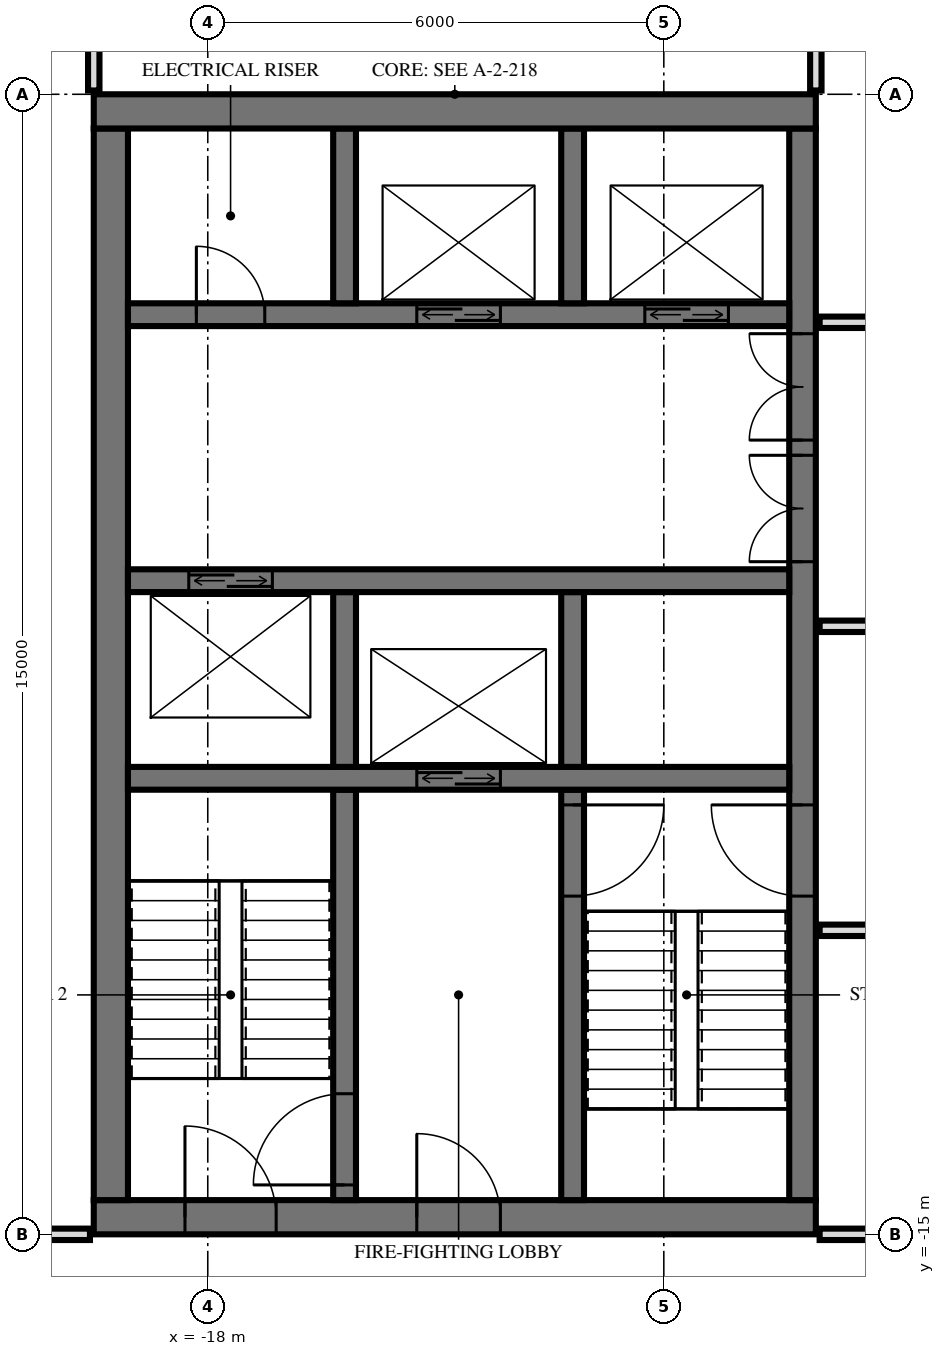
"""IFC4 building model, lengths in metres.
Left out: names, types, materials, properties, quantities, classifications, styles, units other than length and angle.
Written with IfcOpenShell. Run it as: python <this file> out.ifc"""

import sys

from ifc_helpers import new_model, si_unit, direction, frame, frame_2d, origin, place, context, subcontext, project, spatial, rectangle, extrude, element, fill, save


model = new_model("IFC4")
c1 = context("Model", 3, precision=1e-05, world=origin(), true_north=direction((0.0, 1.0)))
c2 = subcontext(c1, "Body", "Model", "MODEL_VIEW")
j1 = project(units=[si_unit("LENGTHUNIT", "METRE"), si_unit("PLANEANGLEUNIT", "RADIAN")], contexts=[c1])
p1 = place(None, origin())
s1 = spatial("IfcSite", under=j1, at=p1, CompositionType="ELEMENT")
p2 = place(p1, origin())
s2 = spatial("IfcBuilding", under=s1, at=p2, CompositionType="ELEMENT")
p3 = place(p2, frame((0.0, 0.0, 314.6)))
s3 = spatial("IfcBuildingStorey", under=s2, at=p3, CompositionType="ELEMENT", Elevation=314.6)
p4 = place(p3, frame((-19.5, -0.225, 0.0), z_axis=(0.0, 0.0, 1.0), x_axis=(1.0, 0.0, 0.0)))
e1 = element("IfcWall", 1, at=p4, inside=s3, PredefinedType="SHEAR", context=c2, shape_type="SweptSolid", body=[
    extrude(rectangle(XDim=9.5, YDim=0.45, at=frame_2d((4.75, 0.0))), origin(), (0.0, 0.0, 1.0), 4.0),
])
p5 = place(p3, frame((-19.5, -14.775, 0.0), z_axis=(0.0, 0.0, 1.0), x_axis=(1.0, 0.0, 0.0)))
e2 = element("IfcWall", 2, at=p5, inside=s3, PredefinedType="SHEAR", context=c2, shape_type="SweptSolid", body=[
    extrude(rectangle(XDim=9.5, YDim=0.45, at=frame_2d((4.75, 0.0))), origin(), (0.0, 0.0, 1.0), 4.0),
])
p6 = place(p5, frame((1.2, 0.0, 0.0)))
e3 = element("IfcOpeningElement", 3, at=p6, cuts=e2, PredefinedType="OPENING", context=c2, shape_type="SweptSolid", body=[
    extrude(rectangle(XDim=1.2, YDim=2.1, at=frame_2d((0.6, 1.05))), frame((0.0, 0.235, 0.0), z_axis=(0.0, -1.0, 0.0), x_axis=(1.0, 0.0, 0.0)), (0.0, 0.0, 1.0), 0.47),
])
p7 = place(p5, frame((4.25, 0.0, 0.0)))
e4 = element("IfcOpeningElement", 4, at=p7, cuts=e2, PredefinedType="OPENING", context=c2, shape_type="SweptSolid", body=[
    extrude(rectangle(XDim=1.1, YDim=2.1, at=frame_2d((0.55, 1.05))), frame((0.0, 0.235, 0.0), z_axis=(0.0, -1.0, 0.0), x_axis=(1.0, 0.0, 0.0)), (0.0, 0.0, 1.0), 0.47),
])
p8 = place(p3, frame((-10.175, -14.55, 0.0), z_axis=(0.0, 0.0, 1.0), x_axis=(0.0, 1.0, 0.0)))
e5 = element("IfcWall", 5, at=p8, inside=s3, PredefinedType="SHEAR", context=c2, shape_type="SweptSolid", body=[
    extrude(rectangle(XDim=14.1, YDim=0.35, at=frame_2d((7.05, 0.0))), origin(), (0.0, 0.0, 1.0), 4.0),
])
p9 = place(p8, frame((8.4, 0.0, 0.0)))
e6 = element("IfcOpeningElement", 6, at=p9, cuts=e5, PredefinedType="OPENING", context=c2, shape_type="SweptSolid", body=[
    extrude(rectangle(XDim=1.4, YDim=2.4, at=frame_2d((0.7, 1.2))), frame((0.0, 0.185, 0.0), z_axis=(0.0, -1.0, 0.0), x_axis=(1.0, 0.0, 0.0)), (0.0, 0.0, 1.0), 0.37),
])
p10 = place(p8, frame((10.0, 0.0, 0.0)))
e7 = element("IfcOpeningElement", 7, at=p10, cuts=e5, PredefinedType="OPENING", context=c2, shape_type="SweptSolid", body=[
    extrude(rectangle(XDim=1.4, YDim=2.4, at=frame_2d((0.7, 1.2))), frame((0.0, 0.185, 0.0), z_axis=(0.0, -1.0, 0.0), x_axis=(1.0, 0.0, 0.0)), (0.0, 0.0, 1.0), 0.37),
])
p11 = place(p8, frame((4.0, 0.0, 0.0)))
e8 = element("IfcOpeningElement", 8, at=p11, cuts=e5, PredefinedType="OPENING", context=c2, shape_type="SweptSolid", body=[
    extrude(rectangle(XDim=1.2, YDim=2.1, at=frame_2d((0.6, 1.05))), frame((0.0, 0.185, 0.0), z_axis=(0.0, -1.0, 0.0), x_axis=(1.0, 0.0, 0.0)), (0.0, 0.0, 1.0), 0.37),
])
p12 = place(p3, frame((-19.275, -14.55, 0.0), z_axis=(0.0, 0.0, 1.0), x_axis=(0.0, 1.0, 0.0)))
e9 = element("IfcWall", 9, at=p12, inside=s3, PredefinedType="SHEAR", context=c2, shape_type="SweptSolid", body=[
    extrude(rectangle(XDim=14.1, YDim=0.45, at=frame_2d((7.05, 0.0))), origin(), (0.0, 0.0, 1.0), 4.0),
])
p13 = place(p3, frame((-19.05, -2.9, 0.0), z_axis=(0.0, 0.0, 1.0), x_axis=(1.0, 0.0, 0.0)))
e10 = element("IfcWall", 10, at=p13, inside=s3, PredefinedType="SHEAR", context=c2, shape_type="SweptSolid", body=[
    extrude(rectangle(XDim=8.7, YDim=0.3, at=frame_2d((4.35, 0.0))), origin(), (0.0, 0.0, 1.0), 4.0),
])
p14 = place(p13, frame((6.8, 0.0, 0.0)))
e11 = element("IfcOpeningElement", 11, at=p14, cuts=e10, PredefinedType="OPENING", context=c2, shape_type="SweptSolid", body=[
    extrude(rectangle(XDim=1.1, YDim=2.1, at=frame_2d((0.55, 1.05))), frame((0.0, 0.16, 0.0), z_axis=(0.0, -1.0, 0.0), x_axis=(1.0, 0.0, 0.0)), (0.0, 0.0, 1.0), 0.32),
])
p15 = place(p13, frame((3.8, 0.0, 0.0)))
e12 = element("IfcOpeningElement", 12, at=p15, cuts=e10, PredefinedType="OPENING", context=c2, shape_type="SweptSolid", body=[
    extrude(rectangle(XDim=1.1, YDim=2.1, at=frame_2d((0.55, 1.05))), frame((0.0, 0.16, 0.0), z_axis=(0.0, -1.0, 0.0), x_axis=(1.0, 0.0, 0.0)), (0.0, 0.0, 1.0), 0.32),
])
p16 = place(p13, frame((0.9, 0.0, 0.0)))
e13 = element("IfcOpeningElement", 13, at=p16, cuts=e10, PredefinedType="OPENING", context=c2, shape_type="SweptSolid", body=[
    extrude(rectangle(XDim=0.9, YDim=2.1, at=frame_2d((0.45, 1.05))), frame((0.0, 0.16, 0.0), z_axis=(0.0, -1.0, 0.0), x_axis=(1.0, 0.0, 0.0)), (0.0, 0.0, 1.0), 0.32),
])
p17 = place(p3, frame((-19.05, -6.4, 0.0), z_axis=(0.0, 0.0, 1.0), x_axis=(1.0, 0.0, 0.0)))
e14 = element("IfcWall", 14, at=p17, inside=s3, PredefinedType="SHEAR", context=c2, shape_type="SweptSolid", body=[
    extrude(rectangle(XDim=8.7, YDim=0.3, at=frame_2d((4.35, 0.0))), origin(), (0.0, 0.0, 1.0), 4.0),
])
p18 = place(p17, frame((0.8, 0.0, 0.0)))
e15 = element("IfcOpeningElement", 15, at=p18, cuts=e14, PredefinedType="OPENING", context=c2, shape_type="SweptSolid", body=[
    extrude(rectangle(XDim=1.1, YDim=2.1, at=frame_2d((0.55, 1.05))), frame((0.0, 0.16, 0.0), z_axis=(0.0, -1.0, 0.0), x_axis=(1.0, 0.0, 0.0)), (0.0, 0.0, 1.0), 0.32),
])
p19 = place(p3, frame((-19.05, -9.0, 0.0), z_axis=(0.0, 0.0, 1.0), x_axis=(1.0, 0.0, 0.0)))
e16 = element("IfcWall", 16, at=p19, inside=s3, PredefinedType="SHEAR", context=c2, shape_type="SweptSolid", body=[
    extrude(rectangle(XDim=8.7, YDim=0.3, at=frame_2d((4.35, 0.0))), origin(), (0.0, 0.0, 1.0), 4.0),
])
p20 = place(p19, frame((3.8, 0.0, 0.0)))
e17 = element("IfcOpeningElement", 17, at=p20, cuts=e16, PredefinedType="OPENING", context=c2, shape_type="SweptSolid", body=[
    extrude(rectangle(XDim=1.1, YDim=2.1, at=frame_2d((0.55, 1.05))), frame((0.0, 0.16, 0.0), z_axis=(0.0, -1.0, 0.0), x_axis=(1.0, 0.0, 0.0)), (0.0, 0.0, 1.0), 0.32),
])
for number, where, z_axis, x_axis in (
    (18, (-13.2, -2.75, 0.0), (0.0, 0.0, 1.0), (0.0, 1.0, 0.0)),
    (19, (-13.2, -8.85, 0.0), (0.0, 0.0, 1.0), (0.0, 1.0, 0.0)),
):
    element("IfcWall", number, at=place(p3, frame(where, z_axis=z_axis, x_axis=x_axis)), inside=s3, PredefinedType="SHEAR", context=c2, shape_type="SweptSolid", body=[
        extrude(rectangle(XDim=2.3, YDim=0.3, at=frame_2d((1.15, 0.0))), origin(), (0.0, 0.0, 1.0), 4.0),
    ])
p21 = place(p3, frame((-13.2, -14.55, 0.0), z_axis=(0.0, 0.0, 1.0), x_axis=(0.0, 1.0, 0.0)))
e20 = element("IfcWall", 20, at=p21, inside=s3, PredefinedType="SHEAR", context=c2, shape_type="SweptSolid", body=[
    extrude(rectangle(XDim=5.4, YDim=0.3, at=frame_2d((2.7, 0.0))), origin(), (0.0, 0.0, 1.0), 4.0),
])
p22 = place(p21, frame((4.0, 0.0, 0.0)))
e21 = element("IfcOpeningElement", 21, at=p22, cuts=e20, PredefinedType="OPENING", context=c2, shape_type="SweptSolid", body=[
    extrude(rectangle(XDim=1.2, YDim=2.1, at=frame_2d((0.6, 1.05))), frame((0.0, 0.16, 0.0), z_axis=(0.0, -1.0, 0.0), x_axis=(1.0, 0.0, 0.0)), (0.0, 0.0, 1.0), 0.32),
])
for number, where, z_axis, x_axis in (
    (22, (-16.2, -2.75, 0.0), (0.0, 0.0, 1.0), (0.0, 1.0, 0.0)),
    (23, (-16.2, -8.85, 0.0), (0.0, 0.0, 1.0), (0.0, 1.0, 0.0)),
):
    element("IfcWall", number, at=place(p3, frame(where, z_axis=z_axis, x_axis=x_axis)), inside=s3, PredefinedType="SHEAR", context=c2, shape_type="SweptSolid", body=[
        extrude(rectangle(XDim=2.3, YDim=0.3, at=frame_2d((1.15, 0.0))), origin(), (0.0, 0.0, 1.0), 4.0),
    ])
p23 = place(p3, frame((-16.2, -14.55, 0.0), z_axis=(0.0, 0.0, 1.0), x_axis=(0.0, 1.0, 0.0)))
e24 = element("IfcWall", 24, at=p23, inside=s3, PredefinedType="SHEAR", context=c2, shape_type="SweptSolid", body=[
    extrude(rectangle(XDim=5.4, YDim=0.3, at=frame_2d((2.7, 0.0))), origin(), (0.0, 0.0, 1.0), 4.0),
])
p24 = place(p23, frame((0.2, 0.0, 0.0)))
e25 = element("IfcOpeningElement", 25, at=p24, cuts=e24, PredefinedType="OPENING", context=c2, shape_type="SweptSolid", body=[
    extrude(rectangle(XDim=1.2, YDim=2.1, at=frame_2d((0.6, 1.05))), frame((0.0, 0.16, 0.0), z_axis=(0.0, -1.0, 0.0), x_axis=(1.0, 0.0, 0.0)), (0.0, 0.0, 1.0), 0.32),
])
p25 = place(p3, frame((-19.568, 1.175, 0.0), z_axis=(0.0, 0.0, 1.0), x_axis=(-0.949694735798, -0.313177120489, 0.0)))
e26 = element("IfcWall", 26, at=p25, inside=s3, PredefinedType="SOLIDWALL", context=c2, shape_type="SweptSolid", body=[
    extrude(rectangle(XDim=1.681, YDim=0.25, at=frame_2d((0.841, 0.0))), origin(), (0.0, 0.0, 1.0), 3.72),
])
p26 = place(p3, frame((-10.0, 0.05, 0.0), z_axis=(0.0, 0.0, 1.0), x_axis=(0.0, 1.0, 0.0)))
e27 = element("IfcWall", 27, at=p26, inside=s3, PredefinedType="PLUMBINGWALL", context=c2, shape_type="SweptSolid", body=[
    extrude(rectangle(XDim=2.247, YDim=0.15, at=frame_2d((1.123, 0.0))), origin(), (0.0, 0.0, 1.0), 3.72),
])
p27 = place(p3, frame((-19.5, 0.05, 0.0), z_axis=(0.0, 0.0, 1.0), x_axis=(0.0, 1.0, 0.0)))
e28 = element("IfcWall", 28, at=p27, inside=s3, PredefinedType="PARTITIONING", context=c2, shape_type="SweptSolid", body=[
    extrude(rectangle(XDim=1.08, YDim=0.15, at=frame_2d((0.54, 0.0))), origin(), (0.0, 0.0, 1.0), 3.72),
])
p28 = place(p3, frame((-21.935, -15.0, 0.0), z_axis=(0.0, 0.0, 1.0), x_axis=(1.0, 0.0, 0.0)))
e29 = element("IfcWall", 29, at=p28, inside=s3, PredefinedType="PARTITIONING", context=c2, shape_type="SweptSolid", body=[
    extrude(rectangle(XDim=2.385, YDim=0.15, at=frame_2d((1.192, 0.0))), origin(), (0.0, 0.0, 1.0), 3.72),
])
p29 = place(p28, frame((0.627, 0.0, 0.0)))
e30 = element("IfcOpeningElement", 30, at=p29, cuts=e29, PredefinedType="OPENING", context=c2, shape_type="SweptSolid", body=[
    extrude(rectangle(XDim=1.0, YDim=2.1, at=frame_2d((0.5, 1.05))), frame((0.0, 0.085, 0.0), z_axis=(0.0, -1.0, 0.0), x_axis=(1.0, 0.0, 0.0)), (0.0, 0.0, 1.0), 0.17),
])
p30 = place(p3, frame((-9.95, -15.0, 0.0), z_axis=(0.0, 0.0, 1.0), x_axis=(1.0, 0.0, 0.0)))
e31 = element("IfcWall", 31, at=p30, inside=s3, PredefinedType="PARTITIONING", context=c2, shape_type="SweptSolid", body=[
    extrude(rectangle(XDim=2.642, YDim=0.15, at=frame_2d((1.321, 0.0))), origin(), (0.0, 0.0, 1.0), 3.084),
])
p31 = place(p3, frame((-9.95, -11.0, 0.0), z_axis=(0.0, 0.0, 1.0), x_axis=(1.0, 0.0, 0.0)))
e32 = element("IfcWall", 32, at=p31, inside=s3, PredefinedType="PARTITIONING", context=c2, shape_type="SweptSolid", body=[
    extrude(rectangle(XDim=19.9, YDim=0.15, at=frame_2d((9.95, 0.0))), origin(), (0.0, 0.0, 1.0), 3.72),
])
p32 = place(p31, frame((9.45, 0.0, 0.0)))
e33 = element("IfcOpeningElement", 33, at=p32, cuts=e32, PredefinedType="OPENING", context=c2, shape_type="SweptSolid", body=[
    extrude(rectangle(XDim=1.0, YDim=2.1, at=frame_2d((0.5, 1.05))), frame((0.0, 0.085, 0.0), z_axis=(0.0, -1.0, 0.0), x_axis=(1.0, 0.0, 0.0)), (0.0, 0.0, 1.0), 0.17),
])
p33 = place(p31, frame((15.45, 0.0, 0.0)))
e34 = element("IfcOpeningElement", 34, at=p33, cuts=e32, PredefinedType="OPENING", context=c2, shape_type="SweptSolid", body=[
    extrude(rectangle(XDim=1.0, YDim=2.1, at=frame_2d((0.5, 1.05))), frame((0.0, 0.085, 0.0), z_axis=(0.0, -1.0, 0.0), x_axis=(1.0, 0.0, 0.0)), (0.0, 0.0, 1.0), 0.17),
])
p34 = place(p3, frame((-9.95, -7.0, 0.0), z_axis=(0.0, 0.0, 1.0), x_axis=(1.0, 0.0, 0.0)))
e35 = element("IfcWall", 35, at=p34, inside=s3, PredefinedType="PARTITIONING", context=c2, shape_type="SweptSolid", body=[
    extrude(rectangle(XDim=19.9, YDim=0.15, at=frame_2d((9.95, 0.0))), origin(), (0.0, 0.0, 1.0), 3.72),
])
p35 = place(p34, frame((9.45, 0.0, 0.0)))
e36 = element("IfcOpeningElement", 36, at=p35, cuts=e35, PredefinedType="OPENING", context=c2, shape_type="SweptSolid", body=[
    extrude(rectangle(XDim=1.0, YDim=2.1, at=frame_2d((0.5, 1.05))), frame((0.0, 0.085, 0.0), z_axis=(0.0, -1.0, 0.0), x_axis=(1.0, 0.0, 0.0)), (0.0, 0.0, 1.0), 0.17),
])
p36 = place(p34, frame((3.45, 0.0, 0.0)))
e37 = element("IfcOpeningElement", 37, at=p36, cuts=e35, PredefinedType="OPENING", context=c2, shape_type="SweptSolid", body=[
    extrude(rectangle(XDim=1.0, YDim=2.1, at=frame_2d((0.5, 1.05))), frame((0.0, 0.085, 0.0), z_axis=(0.0, -1.0, 0.0), x_axis=(1.0, 0.0, 0.0)), (0.0, 0.0, 1.0), 0.17),
])
p37 = place(p3, frame((-9.95, -3.0, 0.0), z_axis=(0.0, 0.0, 1.0), x_axis=(1.0, 0.0, 0.0)))
e38 = element("IfcWall", 38, at=p37, inside=s3, PredefinedType="PARTITIONING", context=c2, shape_type="SweptSolid", body=[
    extrude(rectangle(XDim=19.9, YDim=0.15, at=frame_2d((9.95, 0.0))), origin(), (0.0, 0.0, 1.0), 3.72),
])
p38 = place(p37, frame((0.95, 0.0, 0.0)))
e39 = element("IfcOpeningElement", 39, at=p38, cuts=e38, PredefinedType="OPENING", context=c2, shape_type="SweptSolid", body=[
    extrude(rectangle(XDim=1.0, YDim=2.1, at=frame_2d((0.5, 1.05))), frame((0.0, 0.085, 0.0), z_axis=(0.0, -1.0, 0.0), x_axis=(1.0, 0.0, 0.0)), (0.0, 0.0, 1.0), 0.17),
])
p39 = place(p37, frame((3.7, 0.0, 0.0)))
e40 = element("IfcOpeningElement", 40, at=p39, cuts=e38, PredefinedType="OPENING", context=c2, shape_type="SweptSolid", body=[
    extrude(rectangle(XDim=1.0, YDim=2.1, at=frame_2d((0.5, 1.05))), frame((0.0, 0.085, 0.0), z_axis=(0.0, -1.0, 0.0), x_axis=(1.0, 0.0, 0.0)), (0.0, 0.0, 1.0), 0.17),
])
p40 = place(p37, frame((8.45, 0.0, 0.0)))
e41 = element("IfcOpeningElement", 41, at=p40, cuts=e38, PredefinedType="OPENING", context=c2, shape_type="SweptSolid", body=[
    extrude(rectangle(XDim=1.0, YDim=2.1, at=frame_2d((0.5, 1.05))), frame((0.0, 0.085, 0.0), z_axis=(0.0, -1.0, 0.0), x_axis=(1.0, 0.0, 0.0)), (0.0, 0.0, 1.0), 0.17),
])
p41 = place(p37, frame((15.7, 0.0, 0.0)))
e42 = element("IfcOpeningElement", 42, at=p41, cuts=e38, PredefinedType="OPENING", context=c2, shape_type="SweptSolid", body=[
    extrude(rectangle(XDim=1.0, YDim=2.1, at=frame_2d((0.5, 1.05))), frame((0.0, 0.085, 0.0), z_axis=(0.0, -1.0, 0.0), x_axis=(1.0, 0.0, 0.0)), (0.0, 0.0, 1.0), 0.17),
])
p42 = place(p14, origin())
e43 = element("IfcDoor", 43, at=p42, inside=s3, OperationType="DOUBLE_DOOR_SLIDING", PredefinedType="USERDEFINED", context=c2, shape_type="SweptSolid", body=[
    extrude(rectangle(XDim=1.1, YDim=2.1, at=frame_2d((0.55, 1.05))), frame((0.0, 0.025, 0.0), z_axis=(0.0, -1.0, 0.0), x_axis=(1.0, 0.0, 0.0)), (0.0, 0.0, 1.0), 0.05),
])
fill(e11, e43)
p43 = place(p15, origin())
e44 = element("IfcDoor", 44, at=p43, inside=s3, OperationType="DOUBLE_DOOR_SLIDING", PredefinedType="USERDEFINED", context=c2, shape_type="SweptSolid", body=[
    extrude(rectangle(XDim=1.1, YDim=2.1, at=frame_2d((0.55, 1.05))), frame((0.0, 0.025, 0.0), z_axis=(0.0, -1.0, 0.0), x_axis=(1.0, 0.0, 0.0)), (0.0, 0.0, 1.0), 0.05),
])
fill(e12, e44)
p44 = place(p20, origin())
e45 = element("IfcDoor", 45, at=p44, inside=s3, OperationType="DOUBLE_DOOR_SLIDING", PredefinedType="USERDEFINED", context=c2, shape_type="SweptSolid", body=[
    extrude(rectangle(XDim=1.1, YDim=2.1, at=frame_2d((0.55, 1.05))), frame((0.0, 0.025, 0.0), z_axis=(0.0, -1.0, 0.0), x_axis=(1.0, 0.0, 0.0)), (0.0, 0.0, 1.0), 0.05),
])
fill(e17, e45)
p45 = place(p18, origin())
e46 = element("IfcDoor", 46, at=p45, inside=s3, OperationType="DOUBLE_DOOR_SLIDING", PredefinedType="USERDEFINED", context=c2, shape_type="SweptSolid", body=[
    extrude(rectangle(XDim=1.1, YDim=2.1, at=frame_2d((0.55, 1.05))), frame((0.0, 0.025, 0.0), z_axis=(0.0, -1.0, 0.0), x_axis=(1.0, 0.0, 0.0)), (0.0, 0.0, 1.0), 0.05),
])
fill(e15, e46)
p46 = place(p9, origin())
e47 = element("IfcDoor", 47, at=p46, inside=s3, OperationType="DOUBLE_DOOR_SINGLE_SWING", PredefinedType="DOOR", context=c2, shape_type="SweptSolid", body=[
    extrude(rectangle(XDim=1.4, YDim=2.4, at=frame_2d((0.7, 1.2))), frame((0.0, 0.025, 0.0), z_axis=(0.0, -1.0, 0.0), x_axis=(1.0, 0.0, 0.0)), (0.0, 0.0, 1.0), 0.05),
])
fill(e6, e47)
p47 = place(p10, origin())
e48 = element("IfcDoor", 48, at=p47, inside=s3, OperationType="DOUBLE_DOOR_SINGLE_SWING", PredefinedType="DOOR", context=c2, shape_type="SweptSolid", body=[
    extrude(rectangle(XDim=1.4, YDim=2.4, at=frame_2d((0.7, 1.2))), frame((0.0, 0.025, 0.0), z_axis=(0.0, -1.0, 0.0), x_axis=(1.0, 0.0, 0.0)), (0.0, 0.0, 1.0), 0.05),
])
fill(e7, e48)
p48 = place(p11, origin())
e49 = element("IfcDoor", 49, at=p48, inside=s3, OperationType="SINGLE_SWING_LEFT", PredefinedType="DOOR", context=c2, shape_type="SweptSolid", body=[
    extrude(rectangle(XDim=1.2, YDim=2.1, at=frame_2d((0.6, 1.05))), frame((0.0, 0.025, 0.0), z_axis=(0.0, -1.0, 0.0), x_axis=(1.0, 0.0, 0.0)), (0.0, 0.0, 1.0), 0.05),
])
fill(e8, e49)
p49 = place(p6, origin())
e50 = element("IfcDoor", 50, at=p49, inside=s3, OperationType="SINGLE_SWING_RIGHT", PredefinedType="DOOR", context=c2, shape_type="SweptSolid", body=[
    extrude(rectangle(XDim=1.2, YDim=2.1, at=frame_2d((0.6, 1.05))), frame((0.0, 0.025, 0.0), z_axis=(0.0, -1.0, 0.0), x_axis=(1.0, 0.0, 0.0)), (0.0, 0.0, 1.0), 0.05),
])
fill(e3, e50)
p50 = place(p7, origin())
e51 = element("IfcDoor", 51, at=p50, inside=s3, OperationType="SINGLE_SWING_RIGHT", PredefinedType="DOOR", context=c2, shape_type="SweptSolid", body=[
    extrude(rectangle(XDim=1.1, YDim=2.1, at=frame_2d((0.55, 1.05))), frame((0.0, 0.025, 0.0), z_axis=(0.0, -1.0, 0.0), x_axis=(1.0, 0.0, 0.0)), (0.0, 0.0, 1.0), 0.05),
])
fill(e4, e51)
p51 = place(p16, origin())
e52 = element("IfcDoor", 52, at=p51, inside=s3, OperationType="SINGLE_SWING_RIGHT", PredefinedType="DOOR", context=c2, shape_type="SweptSolid", body=[
    extrude(rectangle(XDim=0.9, YDim=2.1, at=frame_2d((0.45, 1.05))), frame((0.0, 0.025, 0.0), z_axis=(0.0, -1.0, 0.0), x_axis=(1.0, 0.0, 0.0)), (0.0, 0.0, 1.0), 0.05),
])
fill(e13, e52)
p52 = place(p22, frame((0.6, 0.0, 0.0), z_axis=(0.0, 0.0, 1.0), x_axis=(-1.0, 0.0, 0.0)))
e53 = element("IfcDoor", 53, at=p52, inside=s3, OperationType="SINGLE_SWING_RIGHT", PredefinedType="DOOR", context=c2, shape_type="SweptSolid", body=[
    extrude(rectangle(XDim=1.2, YDim=2.1, at=frame_2d((0.0, 1.05))), frame((0.0, -0.025, 0.0), z_axis=(0.0, 1.0, 0.0), x_axis=(-1.0, 0.0, 0.0)), (0.0, 0.0, 1.0), 0.05),
])
fill(e21, e53)
p53 = place(p24, origin())
e54 = element("IfcDoor", 54, at=p53, inside=s3, OperationType="SINGLE_SWING_RIGHT", PredefinedType="DOOR", context=c2, shape_type="SweptSolid", body=[
    extrude(rectangle(XDim=1.2, YDim=2.1, at=frame_2d((0.6, 1.05))), frame((0.0, 0.025, 0.0), z_axis=(0.0, -1.0, 0.0), x_axis=(1.0, 0.0, 0.0)), (0.0, 0.0, 1.0), 0.05),
])
fill(e25, e54)
save(model, sys.argv[1])
